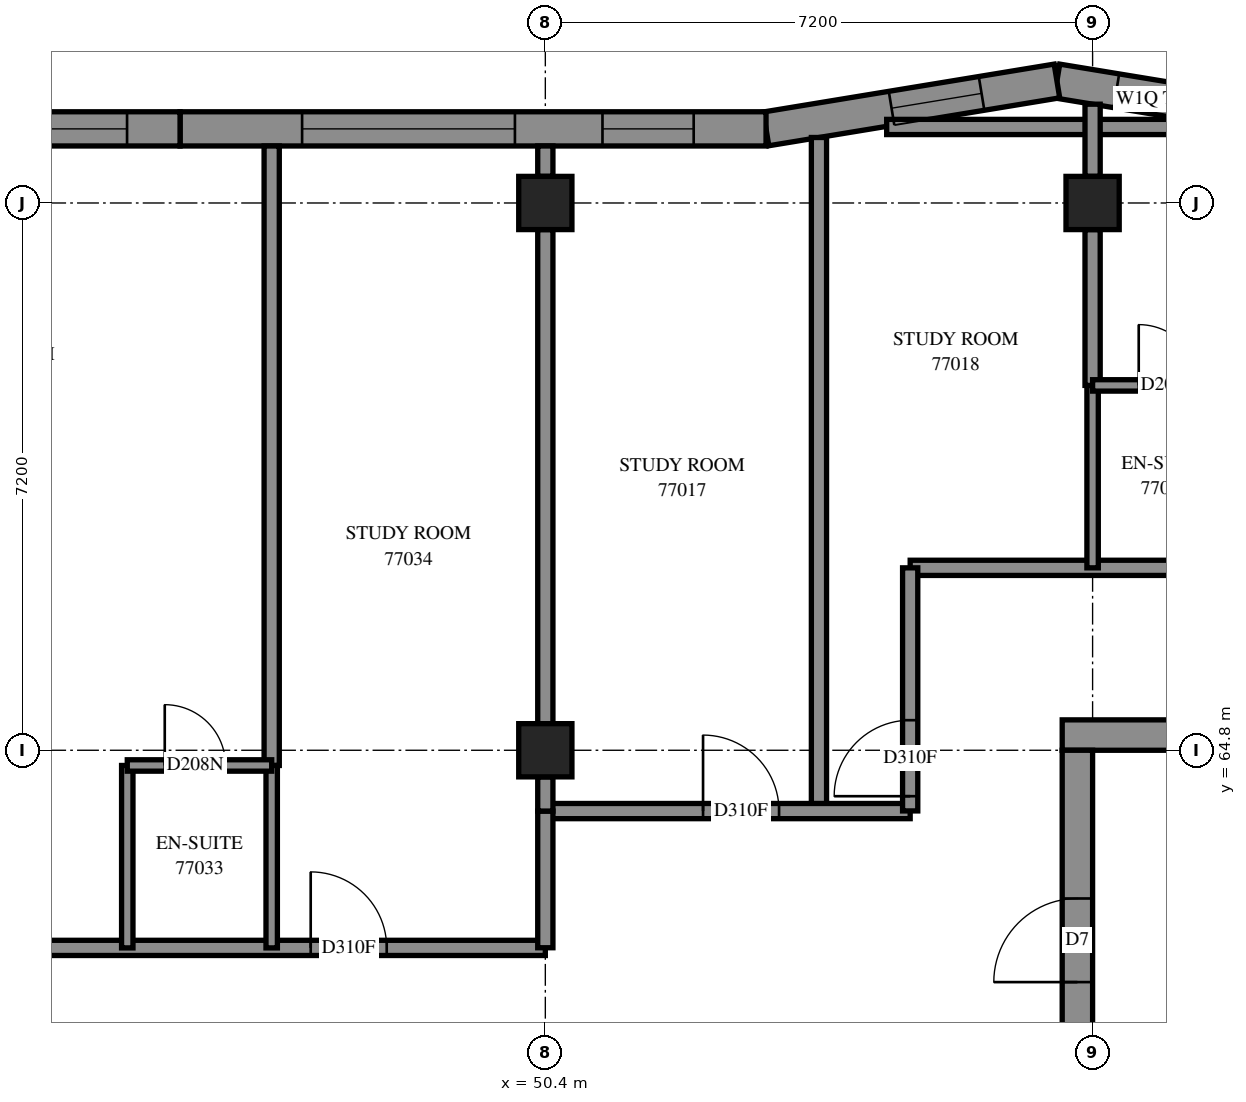
"""IFC4 building model, lengths in metres.
Left out: names, types, materials, properties, quantities, classifications, styles, units other than length and angle.
Written with IfcOpenShell. Run it as: python <this file> out.ifc"""

import sys

from ifc_helpers import new_model, si_unit, direction, frame, frame_2d, origin, origin_2d, place, context, subcontext, project, spatial, polyline, rectangle, outline, extrude, element, fill, save


model = new_model("IFC4")
c1 = context("Model", 3, precision=1e-05, world=origin(), true_north=direction((0.0, 1.0)))
c2 = subcontext(c1, "Body", "Model", "MODEL_VIEW")
j1 = project(units=[si_unit("LENGTHUNIT", "METRE"), si_unit("PLANEANGLEUNIT", "RADIAN")], contexts=[c1])
p1 = place(None, origin())
s1 = spatial("IfcSite", under=j1, at=p1, CompositionType="ELEMENT")
p2 = place(p1, origin())
s2 = spatial("IfcBuilding", under=s1, at=p2, CompositionType="ELEMENT")
p3 = place(p2, frame((0.0, 0.0, 281.2)))
s3 = spatial("IfcBuildingStorey", under=s2, at=p3, CompositionType="ELEMENT", Elevation=281.2)
for number, where, z_axis, x_axis in (
    (1, (50.4, 64.8, 0.0), (0.0, 0.0, 1.0), (1.0, 0.0, 0.0)),
    (2, (50.4, 72.0, 0.0), (0.0, 0.0, 1.0), (1.0, 0.0, 0.0)),
    (3, (57.6, 72.0, 0.0), (0.0, 0.0, 1.0), (1.0, 0.0, 0.0)),
):
    element("IfcColumn", number, at=place(p3, frame(where, z_axis=z_axis, x_axis=x_axis)), inside=s3, PredefinedType="COLUMN", context=c2, shape_type="SweptSolid", body=[
        extrude(rectangle(XDim=0.7, YDim=0.7, at=origin_2d()), origin(), (0.0, 0.0, 1.0), 3.1),
    ])
p4 = place(p3, frame((57.2, 65.0, -0.3), z_axis=(0.0, 0.0, 1.0), x_axis=(1.0, 0.0, 0.0)))
e4 = element("IfcWall", 4, at=p4, inside=s3, PredefinedType="SHEAR", context=c2, shape_type="SweptSolid", body=[
    extrude(rectangle(XDim=15.2, YDim=0.4, at=frame_2d((7.6, 0.0))), origin(), (0.0, 0.0, 1.0), 2.7),
])
p5 = place(p4, frame((10.4, 0.0, 0.3)))
e5 = element("IfcOpeningElement", 5, at=p5, cuts=e4, PredefinedType="OPENING", context=c2, shape_type="SweptSolid", body=[
    extrude(rectangle(XDim=0.8, YDim=2.1, at=frame_2d((0.4, 1.05))), frame((0.0, 0.21, 0.0), z_axis=(0.0, -1.0, 0.0), x_axis=(1.0, 0.0, 0.0)), (0.0, 0.0, 1.0), 0.42),
])
p6 = place(p3, frame((57.4, 50.4, -0.3), z_axis=(0.0, 0.0, 1.0), x_axis=(0.0, 1.0, 0.0)))
e6 = element("IfcWall", 6, at=p6, inside=s3, PredefinedType="SHEAR", context=c2, shape_type="SweptSolid", body=[
    extrude(rectangle(XDim=14.4, YDim=0.4, at=frame_2d((7.2, 0.0))), origin(), (0.0, 0.0, 1.0), 2.7),
])
p7 = place(p6, frame((4.55, 0.0, 0.3)))
e7 = element("IfcOpeningElement", 7, at=p7, cuts=e6, PredefinedType="OPENING", context=c2, shape_type="SweptSolid", body=[
    extrude(rectangle(XDim=1.1, YDim=2.1, at=frame_2d((0.55, 1.05))), frame((0.0, 0.21, 0.0), z_axis=(0.0, -1.0, 0.0), x_axis=(1.0, 0.0, 0.0)), (0.0, 0.0, 1.0), 0.42),
])
p8 = place(p6, frame((11.35, 0.0, 0.3)))
e8 = element("IfcOpeningElement", 8, at=p8, cuts=e6, PredefinedType="OPENING", context=c2, shape_type="SweptSolid", body=[
    extrude(rectangle(XDim=1.1, YDim=2.1, at=frame_2d((0.55, 1.05))), frame((0.0, 0.21, 0.0), z_axis=(0.0, -1.0, 0.0), x_axis=(1.0, 0.0, 0.0)), (0.0, 0.0, 1.0), 0.42),
])
p9 = place(p3, frame((60.958, 72.975, 0.0), z_axis=(0.0, 0.0, 1.0), x_axis=(-0.9867194815, 0.1624335703, 0.0)))
e9 = element("IfcWall", 9, at=p9, inside=s3, PredefinedType="SOLIDWALL", context=c2, shape_type="SweptSolid", body=[
    extrude(outline(polyline([(0.018, -0.225), (3.916, -0.225), (3.841, 0.225), (-0.018, 0.225), (0.018, -0.225)])), origin(), (0.0, 0.0, 1.0), 3.1),
])
p10 = place(p9, frame((0.436, 0.0, 0.45)))
e10 = element("IfcOpeningElement", 10, at=p10, cuts=e9, PredefinedType="OPENING", context=c2, shape_type="SweptSolid", body=[
    extrude(rectangle(XDim=1.0, YDim=2.5, at=frame_2d((0.5, 1.25))), frame((0.0, 0.235, 0.0), z_axis=(0.0, -1.0, 0.0), x_axis=(1.0, 0.0, 0.0)), (0.0, 0.0, 1.0), 0.47),
])
p11 = place(p9, frame((1.786, 0.0, 0.45)))
e11 = element("IfcOpeningElement", 11, at=p11, cuts=e9, PredefinedType="OPENING", context=c2, shape_type="SweptSolid", body=[
    extrude(rectangle(XDim=1.3, YDim=2.5, at=frame_2d((0.65, 1.25))), frame((0.0, 0.235, 0.0), z_axis=(0.0, -1.0, 0.0), x_axis=(1.0, 0.0, 0.0)), (0.0, 0.0, 1.0), 0.47),
])
p12 = place(p3, frame((57.131, 73.605, 0.0), z_axis=(0.0, 0.0, 1.0), x_axis=(-0.9867201618, -0.1624294379, 0.0)))
e12 = element("IfcWall", 12, at=p12, inside=s3, PredefinedType="SOLIDWALL", context=c2, shape_type="SweptSolid", body=[
    extrude(outline(polyline([(-0.037, -0.225), (3.86, -0.225), (3.897, 0.225), (0.037, 0.225), (-0.037, -0.225)])), origin(), (0.0, 0.0, 1.0), 3.1),
])
p13 = place(p12, frame((1.005, 0.0, 0.45)))
e13 = element("IfcOpeningElement", 13, at=p13, cuts=e12, PredefinedType="OPENING", context=c2, shape_type="SweptSolid", body=[
    extrude(rectangle(XDim=1.2, YDim=2.55, at=frame_2d((0.6, 1.275))), frame((0.0, 0.235, 0.0), z_axis=(0.0, -1.0, 0.0), x_axis=(1.0, 0.0, 0.0)), (0.0, 0.0, 1.0), 0.47),
])
p14 = place(p3, frame((53.304, 72.975, 0.0), z_axis=(0.0, 0.0, 1.0), x_axis=(-1.0, 0.0, 0.0)))
e14 = element("IfcWall", 14, at=p14, inside=s3, PredefinedType="SOLIDWALL", context=c2, shape_type="SweptSolid", body=[
    extrude(outline(polyline([(0.018, -0.225), (7.709, -0.225), (7.709, 0.225), (-0.018, 0.225), (0.018, -0.225)])), origin(), (0.0, 0.0, 1.0), 3.1),
])
p15 = place(p14, frame((3.304, 0.0, 0.45)))
e15 = element("IfcOpeningElement", 15, at=p15, cuts=e14, PredefinedType="OPENING", context=c2, shape_type="SweptSolid", body=[
    extrude(rectangle(XDim=2.8, YDim=2.55, at=frame_2d((1.4, 1.275))), frame((0.0, 0.235, 0.0), z_axis=(0.0, -1.0, 0.0), x_axis=(1.0, 0.0, 0.0)), (0.0, 0.0, 1.0), 0.47),
])
p16 = place(p14, frame((0.952, 0.0, 0.45)))
e16 = element("IfcOpeningElement", 16, at=p16, cuts=e14, PredefinedType="OPENING", context=c2, shape_type="SweptSolid", body=[
    extrude(rectangle(XDim=1.2, YDim=2.55, at=frame_2d((0.6, 1.275))), frame((0.0, 0.235, 0.0), z_axis=(0.0, -1.0, 0.0), x_axis=(1.0, 0.0, 0.0)), (0.0, 0.0, 1.0), 0.47),
])
p17 = place(p3, frame((45.594, 72.975, 0.0), z_axis=(0.0, 0.0, 1.0), x_axis=(-1.0, 0.0, 0.0)))
e17 = element("IfcWall", 17, at=p17, inside=s3, PredefinedType="SOLIDWALL", context=c2, shape_type="SweptSolid", body=[
    extrude(outline(polyline([(0.0, -0.225), (7.691, -0.225), (7.691, 0.225), (0.0, 0.225), (0.0, -0.225)])), origin(), (0.0, 0.0, 1.0), 3.1),
])
p18 = place(p17, frame((2.794, 0.0, 0.45)))
e18 = element("IfcOpeningElement", 18, at=p18, cuts=e17, PredefinedType="OPENING", context=c2, shape_type="SweptSolid", body=[
    extrude(rectangle(XDim=2.8, YDim=2.55, at=frame_2d((1.4, 1.275))), frame((0.0, 0.235, 0.0), z_axis=(0.0, -1.0, 0.0), x_axis=(1.0, 0.0, 0.0)), (0.0, 0.0, 1.0), 0.47),
])
p19 = place(p17, frame((0.697, 0.0, 0.45)))
e19 = element("IfcOpeningElement", 19, at=p19, cuts=e17, PredefinedType="OPENING", context=c2, shape_type="SweptSolid", body=[
    extrude(rectangle(XDim=1.2, YDim=2.55, at=frame_2d((0.6, 1.275))), frame((0.0, 0.235, 0.0), z_axis=(0.0, -1.0, 0.0), x_axis=(1.0, 0.0, 0.0)), (0.0, 0.0, 1.0), 0.47),
])
p20 = place(p17, frame((6.143, 0.0, 0.45)))
e20 = element("IfcOpeningElement", 20, at=p20, cuts=e17, PredefinedType="OPENING", context=c2, shape_type="SweptSolid", body=[
    extrude(rectangle(XDim=1.2, YDim=2.55, at=frame_2d((0.6, 1.275))), frame((0.0, 0.235, 0.0), z_axis=(0.0, -1.0, 0.0), x_axis=(1.0, 0.0, 0.0)), (0.0, 0.0, 1.0), 0.47),
])
p21 = place(p3, frame((55.2, 67.2, 0.0), z_axis=(0.0, 0.0, 1.0), x_axis=(1.0, 0.0, 0.0)))
e21 = element("IfcWall", 21, at=p21, inside=s3, PredefinedType="PARTITIONING", context=c2, shape_type="SweptSolid", body=[
    extrude(rectangle(XDim=19.2, YDim=0.2, at=frame_2d((9.6, 0.0))), origin(), (0.0, 0.0, 1.0), 3.1),
])
p22 = place(p21, frame((6.299, 0.0, 0.0)))
e22 = element("IfcOpeningElement", 22, at=p22, cuts=e21, PredefinedType="OPENING", context=c2, shape_type="SweptSolid", body=[
    extrude(rectangle(XDim=0.9, YDim=2.1, at=frame_2d((0.45, 1.05))), frame((0.0, 0.11, 0.0), z_axis=(0.0, -1.0, 0.0), x_axis=(1.0, 0.0, 0.0)), (0.0, 0.0, 1.0), 0.22),
])
p23 = place(p21, frame((13.65, 0.0, 0.0)))
e23 = element("IfcOpeningElement", 23, at=p23, cuts=e21, PredefinedType="OPENING", context=c2, shape_type="SweptSolid", body=[
    extrude(rectangle(XDim=0.9, YDim=2.1, at=frame_2d((0.45, 1.05))), frame((0.0, 0.11, 0.0), z_axis=(0.0, -1.0, 0.0), x_axis=(1.0, 0.0, 0.0)), (0.0, 0.0, 1.0), 0.22),
])
p24 = place(p3, frame((40.602, 62.2, 0.0), z_axis=(0.0, 0.0, 1.0), x_axis=(1.0, 0.0, 0.0)))
e24 = element("IfcWall", 24, at=p24, inside=s3, PredefinedType="PARTITIONING", context=c2, shape_type="SweptSolid", body=[
    extrude(rectangle(XDim=9.798, YDim=0.2, at=frame_2d((4.899, 0.0))), origin(), (0.0, 0.0, 1.0), 3.1),
])
p25 = place(p24, frame((1.306, 0.0, 0.0)))
e25 = element("IfcOpeningElement", 25, at=p25, cuts=e24, PredefinedType="OPENING", context=c2, shape_type="SweptSolid", body=[
    extrude(rectangle(XDim=0.9, YDim=2.1, at=frame_2d((0.45, 1.05))), frame((0.0, 0.11, 0.0), z_axis=(0.0, -1.0, 0.0), x_axis=(1.0, 0.0, 0.0)), (0.0, 0.0, 1.0), 0.22),
])
p26 = place(p24, frame((6.711, 0.0, 0.0)))
e26 = element("IfcOpeningElement", 26, at=p26, cuts=e24, PredefinedType="OPENING", context=c2, shape_type="SweptSolid", body=[
    extrude(rectangle(XDim=1.0, YDim=2.1, at=frame_2d((0.5, 1.05))), frame((0.0, 0.11, 0.0), z_axis=(0.0, -1.0, 0.0), x_axis=(1.0, 0.0, 0.0)), (0.0, 0.0, 1.0), 0.22),
])
p27 = place(p3, frame((54.0, 64.0, 0.0), z_axis=(0.0, 0.0, 1.0), x_axis=(0.0, 1.0, 0.0)))
e27 = element("IfcWall", 27, at=p27, inside=s3, PredefinedType="PARTITIONING", context=c2, shape_type="SweptSolid", body=[
    extrude(rectangle(XDim=8.862, YDim=0.2, at=frame_2d((4.431, 0.0))), origin(), (0.0, 0.0, 1.0), 3.1),
])
p28 = place(p3, frame((46.8, 64.6, 0.0), z_axis=(0.0, 0.0, 1.0), x_axis=(0.0, 1.0, 0.0)))
e28 = element("IfcWall", 28, at=p28, inside=s3, PredefinedType="PARTITIONING", context=c2, shape_type="SweptSolid", body=[
    extrude(rectangle(XDim=8.15, YDim=0.2, at=frame_2d((4.075, 0.0))), origin(), (0.0, 0.0, 1.0), 3.1),
])
p29 = place(p3, frame((50.4, 65.15, 0.0), z_axis=(0.0, 0.0, 1.0), x_axis=(0.0, 1.0, 0.0)))
e29 = element("IfcWall", 29, at=p29, inside=s3, PredefinedType="PARTITIONING", context=c2, shape_type="SweptSolid", body=[
    extrude(rectangle(XDim=6.5, YDim=0.2, at=frame_2d((3.25, 0.0))), origin(), (0.0, 0.0, 1.0), 3.1),
])
p30 = place(p3, frame((50.4, 64.0, 0.0), z_axis=(0.0, 0.0, 1.0), x_axis=(1.0, 0.0, 0.0)))
e30 = element("IfcWall", 30, at=p30, inside=s3, PredefinedType="PARTITIONING", context=c2, shape_type="SweptSolid", body=[
    extrude(rectangle(XDim=4.8, YDim=0.2, at=frame_2d((2.4, 0.0))), origin(), (0.0, 0.0, 1.0), 3.1),
])
p31 = place(p30, frame((2.075, 0.0, 0.0)))
e31 = element("IfcOpeningElement", 31, at=p31, cuts=e30, PredefinedType="OPENING", context=c2, shape_type="SweptSolid", body=[
    extrude(rectangle(XDim=1.0, YDim=2.1, at=frame_2d((0.5, 1.05))), frame((0.0, 0.11, 0.0), z_axis=(0.0, -1.0, 0.0), x_axis=(1.0, 0.0, 0.0)), (0.0, 0.0, 1.0), 0.22),
])
p32 = place(p3, frame((54.891, 73.0, 0.0), z_axis=(0.0, 0.0, 1.0), x_axis=(1.0, 0.0, 0.0)))
e32 = element("IfcWall", 32, at=p32, inside=s3, PredefinedType="PARTITIONING", context=c2, shape_type="SweptSolid", body=[
    extrude(rectangle(XDim=4.48, YDim=0.2, at=frame_2d((2.24, 0.0))), origin(), (0.0, 0.0, 1.0), 3.1),
])
p33 = place(p3, frame((55.2, 64.002, 0.0), z_axis=(0.0, 0.0, 1.0), x_axis=(0.0, 1.0, 0.0)))
e33 = element("IfcWall", 33, at=p33, inside=s3, PredefinedType="PARTITIONING", context=c2, shape_type="SweptSolid", body=[
    extrude(rectangle(XDim=3.198, YDim=0.2, at=frame_2d((1.599, 0.0))), origin(), (0.0, 0.0, 1.0), 3.1),
])
p34 = place(p33, frame((0.194, 0.0, 0.0)))
e34 = element("IfcOpeningElement", 34, at=p34, cuts=e33, PredefinedType="OPENING", context=c2, shape_type="SweptSolid", body=[
    extrude(rectangle(XDim=1.0, YDim=2.1, at=frame_2d((0.5, 1.05))), frame((0.0, 0.11, 0.0), z_axis=(0.0, -1.0, 0.0), x_axis=(1.0, 0.0, 0.0)), (0.0, 0.0, 1.0), 0.22),
])
for number, where, z_axis, x_axis in (
    (35, (44.9, 62.2, 0.0), (0.0, 0.0, 1.0), (0.0, 1.0, 0.0)),
    (36, (46.8, 62.2, 0.0), (0.0, 0.0, 1.0), (0.0, 1.0, 0.0)),
    (37, (57.6, 67.2, 0.0), (0.0, 0.0, 1.0), (0.0, 1.0, 0.0)),
):
    element("IfcWall", number, at=place(p3, frame(where, z_axis=z_axis, x_axis=x_axis)), inside=s3, PredefinedType="PARTITIONING", context=c2, shape_type="SweptSolid", body=[
        extrude(rectangle(XDim=2.4, YDim=0.15, at=frame_2d((1.2, 0.0))), origin(), (0.0, 0.0, 1.0), 3.1),
    ])
p35 = place(p3, frame((57.6, 69.6, 0.0), z_axis=(0.0, 0.0, 1.0), x_axis=(0.0, 1.0, 0.0)))
e38 = element("IfcWall", 38, at=p35, inside=s3, PredefinedType="PARTITIONING", context=c2, shape_type="SweptSolid", body=[
    extrude(rectangle(XDim=2.05, YDim=0.2, at=frame_2d((1.025, 0.0))), origin(), (0.0, 0.0, 1.0), 3.1),
])
p36 = place(p3, frame((44.9, 64.6, 0.0), z_axis=(0.0, 0.0, 1.0), x_axis=(1.0, 0.0, 0.0)))
e39 = element("IfcWall", 39, at=p36, inside=s3, PredefinedType="PARTITIONING", context=c2, shape_type="SweptSolid", body=[
    extrude(rectangle(XDim=1.9, YDim=0.15, at=frame_2d((0.95, 0.0))), origin(), (0.0, 0.0, 1.0), 3.1),
])
p37 = place(p36, frame((0.493, 0.0, 0.0)))
e40 = element("IfcOpeningElement", 40, at=p37, cuts=e39, PredefinedType="OPENING", context=c2, shape_type="SweptSolid", body=[
    extrude(rectangle(XDim=0.8, YDim=2.1, at=frame_2d((0.4, 1.05))), frame((0.0, 0.085, 0.0), z_axis=(0.0, -1.0, 0.0), x_axis=(1.0, 0.0, 0.0)), (0.0, 0.0, 1.0), 0.17),
])
p38 = place(p3, frame((57.6, 69.6, 0.0), z_axis=(0.0, 0.0, 1.0), x_axis=(1.0, 0.0, 0.0)))
e41 = element("IfcWall", 41, at=p38, inside=s3, PredefinedType="PARTITIONING", context=c2, shape_type="SweptSolid", body=[
    extrude(rectangle(XDim=1.9, YDim=0.15, at=frame_2d((0.95, 0.0))), origin(), (0.0, 0.0, 1.0), 3.1),
])
p39 = place(p38, frame((0.607, 0.0, 0.0)))
e42 = element("IfcOpeningElement", 42, at=p39, cuts=e41, PredefinedType="OPENING", context=c2, shape_type="SweptSolid", body=[
    extrude(rectangle(XDim=0.8, YDim=2.1, at=frame_2d((0.4, 1.05))), frame((0.0, 0.085, 0.0), z_axis=(0.0, -1.0, 0.0), x_axis=(1.0, 0.0, 0.0)), (0.0, 0.0, 1.0), 0.17),
])
p40 = place(p3, frame((50.4, 62.202, 0.0), z_axis=(0.0, 0.0, 1.0), x_axis=(0.0, 1.0, 0.0)))
e43 = element("IfcWall", 43, at=p40, inside=s3, PredefinedType="PARTITIONING", context=c2, shape_type="SweptSolid", body=[
    extrude(rectangle(XDim=1.798, YDim=0.2, at=frame_2d((0.899, 0.0))), origin(), (0.0, 0.0, 1.0), 3.1),
])
p41 = place(p3, frame((57.6, 72.35, 0.0), z_axis=(0.0, 0.0, 1.0), x_axis=(0.0, 1.0, 0.0)))
e44 = element("IfcWall", 44, at=p41, inside=s3, PredefinedType="PARTITIONING", context=c2, shape_type="SweptSolid", body=[
    extrude(rectangle(XDim=0.95, YDim=0.2, at=frame_2d((0.475, 0.0))), origin(), (0.0, 0.0, 1.0), 3.1),
])
p42 = place(p3, frame((50.4, 64.0, 0.0), z_axis=(0.0, 0.0, 1.0), x_axis=(0.0, 1.0, 0.0)))
e45 = element("IfcWall", 45, at=p42, inside=s3, PredefinedType="PARTITIONING", context=c2, shape_type="SweptSolid", body=[
    extrude(rectangle(XDim=0.45, YDim=0.2, at=frame_2d((0.225, 0.0))), origin(), (0.0, 0.0, 1.0), 3.1),
])
p43 = place(p3, frame((50.4, 72.35, 0.0), z_axis=(0.0, 0.0, 1.0), x_axis=(0.0, 1.0, 0.0)))
e46 = element("IfcWall", 46, at=p43, inside=s3, PredefinedType="PARTITIONING", context=c2, shape_type="SweptSolid", body=[
    extrude(rectangle(XDim=0.4, YDim=0.2, at=frame_2d((0.2, 0.0))), origin(), (0.0, 0.0, 1.0), 3.1),
])
p44 = place(p13, origin())
e47 = element("IfcWindow", 47, at=p44, inside=s3, PartitioningType="SINGLE_PANEL", PredefinedType="WINDOW", context=c2, shape_type="SweptSolid", body=[
    extrude(rectangle(XDim=1.2, YDim=2.55, at=frame_2d((0.6, 1.275))), frame((0.0, 0.115, 0.0), z_axis=(0.0, -1.0, 0.0), x_axis=(1.0, 0.0, 0.0)), (0.0, 0.0, 1.0), 0.06),
])
fill(e13, e47)
p45 = place(p15, origin())
e48 = element("IfcWindow", 48, at=p45, inside=s3, PartitioningType="SINGLE_PANEL", PredefinedType="WINDOW", context=c2, shape_type="SweptSolid", body=[
    extrude(rectangle(XDim=2.8, YDim=2.55, at=frame_2d((1.4, 1.275))), frame((0.0, 0.205, 0.0), z_axis=(0.0, -1.0, 0.0), x_axis=(1.0, 0.0, 0.0)), (0.0, 0.0, 1.0), 0.06),
])
fill(e15, e48)
p46 = place(p16, origin())
e49 = element("IfcWindow", 49, at=p46, inside=s3, PartitioningType="SINGLE_PANEL", PredefinedType="WINDOW", context=c2, shape_type="SweptSolid", body=[
    extrude(rectangle(XDim=1.2, YDim=2.55, at=frame_2d((0.6, 1.275))), frame((0.0, 0.205, 0.0), z_axis=(0.0, -1.0, 0.0), x_axis=(1.0, 0.0, 0.0)), (0.0, 0.0, 1.0), 0.06),
])
fill(e16, e49)
p47 = place(p19, origin())
e50 = element("IfcWindow", 50, at=p47, inside=s3, PartitioningType="SINGLE_PANEL", PredefinedType="WINDOW", context=c2, shape_type="SweptSolid", body=[
    extrude(rectangle(XDim=1.2, YDim=2.55, at=frame_2d((0.6, 1.275))), frame((0.0, 0.205, 0.0), z_axis=(0.0, -1.0, 0.0), x_axis=(1.0, 0.0, 0.0)), (0.0, 0.0, 1.0), 0.06),
])
fill(e19, e50)
p48 = place(p8, origin())
e51 = element("IfcDoor", 51, at=p48, inside=s3, OperationType="SINGLE_SWING_LEFT", PredefinedType="DOOR", context=c2, shape_type="SweptSolid", body=[
    extrude(rectangle(XDim=1.1, YDim=2.1, at=frame_2d((0.55, 1.05))), frame((0.0, 0.025, 0.0), z_axis=(0.0, -1.0, 0.0), x_axis=(1.0, 0.0, 0.0)), (0.0, 0.0, 1.0), 0.05),
])
fill(e8, e51)
p49 = place(p31, origin())
e52 = element("IfcDoor", 52, at=p49, inside=s3, OperationType="SINGLE_SWING_RIGHT", PredefinedType="DOOR", context=c2, shape_type="SweptSolid", body=[
    extrude(rectangle(XDim=1.0, YDim=2.1, at=frame_2d((0.5, 1.05))), frame((0.0, 0.025, 0.0), z_axis=(0.0, -1.0, 0.0), x_axis=(1.0, 0.0, 0.0)), (0.0, 0.0, 1.0), 0.05),
])
fill(e31, e52)
p50 = place(p34, origin())
e53 = element("IfcDoor", 53, at=p50, inside=s3, OperationType="SINGLE_SWING_LEFT", PredefinedType="DOOR", context=c2, shape_type="SweptSolid", body=[
    extrude(rectangle(XDim=1.0, YDim=2.1, at=frame_2d((0.5, 1.05))), frame((0.0, 0.025, 0.0), z_axis=(0.0, -1.0, 0.0), x_axis=(1.0, 0.0, 0.0)), (0.0, 0.0, 1.0), 0.05),
])
fill(e34, e53)
p51 = place(p39, origin())
e54 = element("IfcDoor", 54, at=p51, inside=s3, OperationType="SINGLE_SWING_RIGHT", PredefinedType="DOOR", context=c2, shape_type="SweptSolid", body=[
    extrude(rectangle(XDim=0.8, YDim=2.1, at=frame_2d((0.4, 1.05))), frame((0.0, 0.025, 0.0), z_axis=(0.0, -1.0, 0.0), x_axis=(1.0, 0.0, 0.0)), (0.0, 0.0, 1.0), 0.05),
])
fill(e42, e54)
p52 = place(p37, origin())
e55 = element("IfcDoor", 55, at=p52, inside=s3, OperationType="SINGLE_SWING_RIGHT", PredefinedType="DOOR", context=c2, shape_type="SweptSolid", body=[
    extrude(rectangle(XDim=0.8, YDim=2.1, at=frame_2d((0.4, 1.05))), frame((0.0, 0.025, 0.0), z_axis=(0.0, -1.0, 0.0), x_axis=(1.0, 0.0, 0.0)), (0.0, 0.0, 1.0), 0.05),
])
fill(e40, e55)
p53 = place(p26, origin())
e56 = element("IfcDoor", 56, at=p53, inside=s3, OperationType="SINGLE_SWING_LEFT", PredefinedType="DOOR", context=c2, shape_type="SweptSolid", body=[
    extrude(rectangle(XDim=1.0, YDim=2.1, at=frame_2d((0.5, 1.05))), frame((0.0, 0.025, 0.0), z_axis=(0.0, -1.0, 0.0), x_axis=(1.0, 0.0, 0.0)), (0.0, 0.0, 1.0), 0.05),
])
fill(e26, e56)
p54 = place(p11, origin())
e57 = element("IfcWindow", 57, at=p54, inside=s3, PartitioningType="SINGLE_PANEL", PredefinedType="WINDOW", context=c2, shape_type="SweptSolid", body=[
    extrude(rectangle(XDim=1.3, YDim=2.5, at=frame_2d((0.65, 1.25))), frame((0.0, 0.135, 0.0), z_axis=(0.0, -1.0, 0.0), x_axis=(1.0, 0.0, 0.0)), (0.0, 0.0, 1.0), 0.06),
])
fill(e11, e57)
save(model, sys.argv[1])
